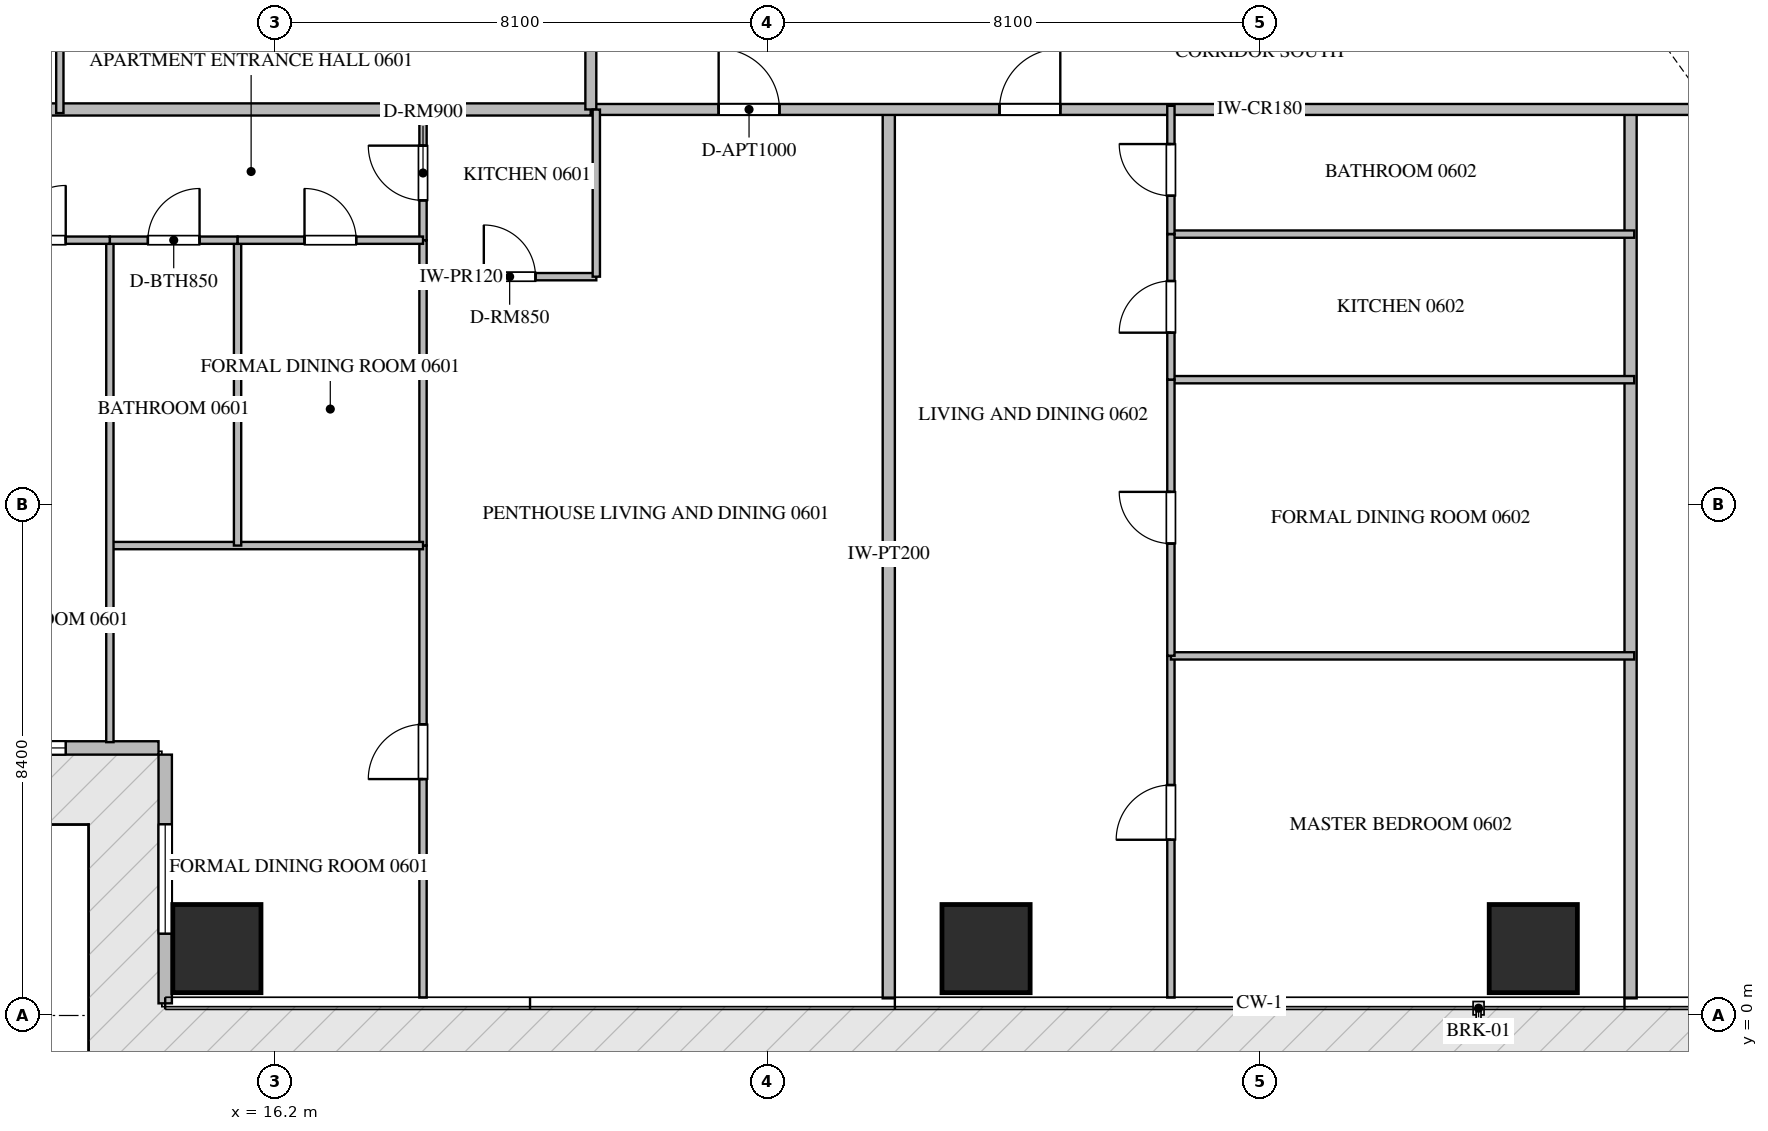
"""IFC4 building model, lengths in metres.
Left out: names, types, materials, properties, quantities, classifications, styles, units other than length and angle.
Written with IfcOpenShell. Run it as: python <this file> out.ifc"""

import sys

from ifc_helpers import new_model, si_unit, direction, frame, frame_2d, origin, origin_2d, place, context, subcontext, project, spatial, rectangle, extrude, source, transform, mapped, element, fill, save


model = new_model("IFC4")
c1 = context("Model", 3, precision=1e-05, world=origin(), true_north=direction((0.0, 1.0)))
c2 = subcontext(c1, "Body", "Model", "MODEL_VIEW")
j1 = project(units=[si_unit("LENGTHUNIT", "METRE"), si_unit("PLANEANGLEUNIT", "RADIAN")], contexts=[c1])
p1 = place(None, origin())
s1 = spatial("IfcSite", under=j1, at=p1, CompositionType="ELEMENT")
p2 = place(p1, origin())
s2 = spatial("IfcBuilding", under=s1, at=p2, CompositionType="ELEMENT")
p3 = place(p2, frame((0.0, 0.0, 30.45)))
s3 = spatial("IfcBuildingStorey", under=s2, at=p3, CompositionType="ELEMENT", Elevation=30.45)
m1 = source(origin(), c2, "Body", "SweptSolid", [
    extrude(rectangle(XDim=1.45, YDim=1.45, at=origin_2d()), origin(), (0.0, 0.0, 1.0), 3.75),
])
for number, where, z_axis, x_axis in (
    (1, (15.25, 1.1, -0.26), (0.0, 0.0, 1.0), (1.0, 0.0, 0.0)),
    (2, (27.9, 1.1, -0.26), (0.0, 0.0, 1.0), (1.0, 0.0, 0.0)),
    (3, (36.9, 1.1, -0.26), (0.0, 0.0, 1.0), (1.0, 0.0, 0.0)),
):
    element("IfcColumn", number, at=place(p3, frame(where, z_axis=z_axis, x_axis=x_axis)), inside=s3, PredefinedType="COLUMN", context=c2, shape_type="MappedRepresentation", body=[
        mapped(m1, transform((0.0, 0.0, 0.0), scale=1.0)),
    ])
p4 = place(p3, frame((10.31, 4.4, 0.0), z_axis=(0.0, 0.0, 1.0), x_axis=(1.0, 0.0, 0.0)))
e4 = element("IfcWall", 4, at=p4, inside=s3, PredefinedType="ELEMENTEDWALL", context=c2, shape_type="SweptSolid", body=[
    extrude(rectangle(XDim=3.98, YDim=0.22, at=frame_2d((1.99, 0.0))), origin(), (0.0, 0.0, 1.0), 3.475),
])
p5 = place(p4, frame((0.654, 0.0, 0.65)))
e5 = element("IfcOpeningElement", 5, at=p5, cuts=e4, PredefinedType="OPENING", context=c2, shape_type="SweptSolid", body=[
    extrude(rectangle(XDim=1.8, YDim=2.1, at=frame_2d((0.9, 1.05))), frame((0.0, 0.12, 0.0), z_axis=(0.0, -1.0, 0.0), x_axis=(1.0, 0.0, 0.0)), (0.0, 0.0, 1.0), 0.24),
])
p6 = place(p3, frame((14.4, 4.29, 0.0), z_axis=(0.0, 0.0, 1.0), x_axis=(0.0, -1.0, 0.0)))
e6 = element("IfcWall", 6, at=p6, inside=s3, PredefinedType="ELEMENTEDWALL", context=c2, shape_type="SweptSolid", body=[
    extrude(rectangle(XDim=4.09, YDim=0.22, at=frame_2d((2.045, 0.0))), origin(), (0.0, 0.0, 1.0), 3.475),
])
p7 = place(p6, frame((1.145, 0.0, 0.65)))
e7 = element("IfcOpeningElement", 7, at=p7, cuts=e6, PredefinedType="OPENING", context=c2, shape_type="SweptSolid", body=[
    extrude(rectangle(XDim=1.8, YDim=2.1, at=frame_2d((0.9, 1.05))), frame((0.0, 0.12, 0.0), z_axis=(0.0, -1.0, 0.0), x_axis=(1.0, 0.0, 0.0)), (0.0, 0.0, 1.0), 0.24),
])
for number, where, z_axis, x_axis in (
    (8, (26.3, 0.282, 0.0), (0.0, 0.0, 1.0), (0.0, 1.0, 0.0)),
    (9, (38.5, 0.282, 0.0), (0.0, 0.0, 1.0), (0.0, 1.0, 0.0)),
):
    element("IfcWall", number, at=place(p3, frame(where, z_axis=z_axis, x_axis=x_axis)), inside=s3, PredefinedType="PARTITIONING", context=c2, shape_type="SweptSolid", body=[
        extrude(rectangle(XDim=14.618, YDim=0.2, at=frame_2d((7.309, 0.0))), origin(), (0.0, 0.0, 1.0), 3.49),
    ])
p8 = place(p3, frame((6.082, 14.9, 0.0), z_axis=(0.0, 0.0, 1.0), x_axis=(1.0, 0.0, 0.0)))
e10 = element("IfcWall", 10, at=p8, inside=s3, PredefinedType="PARTITIONING", context=c2, shape_type="SweptSolid", body=[
    extrude(rectangle(XDim=15.318, YDim=0.2, at=frame_2d((7.659, 0.0))), origin(), (0.0, 0.0, 1.0), 3.49),
])
p9 = place(p3, frame((21.402, 14.9, 0.0), z_axis=(0.0, 0.0, 1.0), x_axis=(1.0, 0.0, 0.0)))
e11 = element("IfcWall", 11, at=p9, inside=s3, PredefinedType="PARTITIONING", context=c2, shape_type="SweptSolid", body=[
    extrude(rectangle(XDim=21.996, YDim=0.18, at=frame_2d((10.998, 0.0))), origin(), (0.0, 0.0, 1.0), 3.49),
])
p10 = place(p9, frame((2.1, 0.0, 0.0)))
e12 = element("IfcOpeningElement", 12, at=p10, cuts=e11, PredefinedType="OPENING", context=c2, shape_type="SweptSolid", body=[
    extrude(rectangle(XDim=1.0, YDim=2.15, at=frame_2d((0.5, 1.075))), frame((0.0, 0.1, 0.0), z_axis=(0.0, -1.0, 0.0), x_axis=(1.0, 0.0, 0.0)), (0.0, 0.0, 1.0), 0.2),
])
p11 = place(p9, frame((6.719, 0.0, 0.0)))
e13 = element("IfcOpeningElement", 13, at=p11, cuts=e11, PredefinedType="OPENING", context=c2, shape_type="SweptSolid", body=[
    extrude(rectangle(XDim=1.0, YDim=2.15, at=frame_2d((0.5, 1.075))), frame((0.0, 0.1, 0.0), z_axis=(0.0, -1.0, 0.0), x_axis=(1.0, 0.0, 0.0)), (0.0, 0.0, 1.0), 0.2),
])
p12 = place(p9, frame((18.896, 0.0, 0.0)))
e14 = element("IfcOpeningElement", 14, at=p12, cuts=e11, PredefinedType="OPENING", context=c2, shape_type="SweptSolid", body=[
    extrude(rectangle(XDim=1.0, YDim=2.15, at=frame_2d((0.5, 1.075))), frame((0.0, 0.1, 0.0), z_axis=(0.0, -1.0, 0.0), x_axis=(1.0, 0.0, 0.0)), (0.0, 0.0, 1.0), 0.2),
])
p13 = place(p3, frame((21.4, 14.9, 0.0), z_axis=(0.0, 0.0, 1.0), x_axis=(0.0, 1.0, 0.0)))
e15 = element("IfcWall", 15, at=p13, inside=s3, PredefinedType="PARTITIONING", context=c2, shape_type="SweptSolid", body=[
    extrude(rectangle(XDim=20.6, YDim=0.18, at=frame_2d((10.3, 0.0))), origin(), (0.0, 0.0, 1.0), 3.49),
])
p14 = place(p13, frame((17.64, 0.0, 0.0)))
e16 = element("IfcOpeningElement", 16, at=p14, cuts=e15, PredefinedType="OPENING", context=c2, shape_type="SweptSolid", body=[
    extrude(rectangle(XDim=1.0, YDim=2.15, at=frame_2d((0.5, 1.075))), frame((0.0, 0.1, 0.0), z_axis=(0.0, -1.0, 0.0), x_axis=(1.0, 0.0, 0.0)), (0.0, 0.0, 1.0), 0.2),
])
p15 = place(p3, frame((18.64, 12.15, 0.0), z_axis=(0.0, 0.0, 1.0), x_axis=(1.0, 0.0, 0.0)))
e17 = element("IfcWall", 17, at=p15, inside=s3, PredefinedType="PARTITIONING", context=c2, shape_type="SweptSolid", body=[
    extrude(rectangle(XDim=2.85, YDim=0.12, at=frame_2d((1.425, 0.0))), origin(), (0.0, 0.0, 1.0), 3.49),
])
p16 = place(p15, frame((1.0, 0.0, 0.0)))
e18 = element("IfcOpeningElement", 18, at=p16, cuts=e17, PredefinedType="OPENING", context=c2, shape_type="SweptSolid", body=[
    extrude(rectangle(XDim=0.85, YDim=2.1, at=frame_2d((0.425, 1.05))), frame((0.0, 0.07, 0.0), z_axis=(0.0, -1.0, 0.0), x_axis=(1.0, 0.0, 0.0)), (0.0, 0.0, 1.0), 0.14),
])
p17 = place(p3, frame((21.49, 12.15, 0.0), z_axis=(0.0, 0.0, 1.0), x_axis=(0.0, 1.0, 0.0)))
e19 = element("IfcWall", 19, at=p17, inside=s3, PredefinedType="PARTITIONING", context=c2, shape_type="SweptSolid", body=[
    extrude(rectangle(XDim=2.748, YDim=0.12, at=frame_2d((1.374, 0.0))), origin(), (0.0, 0.0, 1.0), 3.49),
])
p18 = place(p3, frame((18.64, 12.75, 0.0), z_axis=(0.0, 0.0, 1.0), x_axis=(0.0, 1.0, 0.0)))
e20 = element("IfcWall", 20, at=p18, inside=s3, PredefinedType="PARTITIONING", context=c2, shape_type="SweptSolid", body=[
    extrude(rectangle(XDim=2.21, YDim=0.12, at=frame_2d((1.105, 0.0))), origin(), (0.0, 0.0, 1.0), 3.49),
])
p19 = place(p18, frame((0.655, 0.0, 0.0)))
e21 = element("IfcOpeningElement", 21, at=p19, cuts=e20, PredefinedType="OPENING", context=c2, shape_type="SweptSolid", body=[
    extrude(rectangle(XDim=0.9, YDim=2.1, at=frame_2d((0.45, 1.05))), frame((0.0, 0.07, 0.0), z_axis=(0.0, -1.0, 0.0), x_axis=(1.0, 0.0, 0.0)), (0.0, 0.0, 1.0), 0.14),
])
p20 = place(p3, frame((18.64, 0.295, 0.0), z_axis=(0.0, 0.0, 1.0), x_axis=(0.0, 1.0, 0.0)))
e22 = element("IfcWall", 22, at=p20, inside=s3, PredefinedType="PARTITIONING", context=c2, shape_type="SweptSolid", body=[
    extrude(rectangle(XDim=7.433, YDim=0.12, at=frame_2d((3.717, 0.0))), origin(), (0.0, 0.0, 1.0), 3.49),
])
p21 = place(p20, frame((3.593, 0.0, 0.0)))
e23 = element("IfcOpeningElement", 23, at=p21, cuts=e22, PredefinedType="OPENING", context=c2, shape_type="SweptSolid", body=[
    extrude(rectangle(XDim=0.9, YDim=2.1, at=frame_2d((0.45, 1.05))), frame((0.0, 0.07, 0.0), z_axis=(0.0, -1.0, 0.0), x_axis=(1.0, 0.0, 0.0)), (0.0, 0.0, 1.0), 0.14),
])
p22 = place(p3, frame((18.64, 7.73, 0.0), z_axis=(0.0, 0.0, 1.0), x_axis=(0.0, 1.0, 0.0)))
e24 = element("IfcWall", 24, at=p22, inside=s3, PredefinedType="PARTITIONING", context=c2, shape_type="SweptSolid", body=[
    extrude(rectangle(XDim=5.018, YDim=0.12, at=frame_2d((2.509, 0.0))), origin(), (0.0, 0.0, 1.0), 3.49),
])
p23 = place(p3, frame((13.49, 7.728, 0.0), z_axis=(0.0, 0.0, 1.0), x_axis=(1.0, 0.0, 0.0)))
e25 = element("IfcWall", 25, at=p23, inside=s3, PredefinedType="PARTITIONING", context=c2, shape_type="SweptSolid", body=[
    extrude(rectangle(XDim=5.15, YDim=0.12, at=frame_2d((2.575, 0.0))), origin(), (0.0, 0.0, 1.0), 3.49),
])
p24 = place(p3, frame((13.49, 4.495, 0.0), z_axis=(0.0, 0.0, 1.0), x_axis=(0.0, 1.0, 0.0)))
e26 = element("IfcWall", 26, at=p24, inside=s3, PredefinedType="PARTITIONING", context=c2, shape_type="SweptSolid", body=[
    extrude(rectangle(XDim=8.255, YDim=0.12, at=frame_2d((4.127, 0.0))), origin(), (0.0, 0.0, 1.0), 3.49),
])
p25 = place(p3, frame((15.59, 7.728, 0.0), z_axis=(0.0, 0.0, 1.0), x_axis=(0.0, 1.0, 0.0)))
e27 = element("IfcWall", 27, at=p25, inside=s3, PredefinedType="PARTITIONING", context=c2, shape_type="SweptSolid", body=[
    extrude(rectangle(XDim=5.022, YDim=0.12, at=frame_2d((2.511, 0.0))), origin(), (0.0, 0.0, 1.0), 3.49),
])
p26 = place(p3, frame((13.49, 12.75, 0.0), z_axis=(0.0, 0.0, 1.0), x_axis=(1.0, 0.0, 0.0)))
e28 = element("IfcWall", 28, at=p26, inside=s3, PredefinedType="PARTITIONING", context=c2, shape_type="SweptSolid", body=[
    extrude(rectangle(XDim=2.1, YDim=0.12, at=frame_2d((1.05, 0.0))), origin(), (0.0, 0.0, 1.0), 3.49),
])
p27 = place(p26, frame((0.625, 0.0, 0.0)))
e29 = element("IfcOpeningElement", 29, at=p27, cuts=e28, PredefinedType="OPENING", context=c2, shape_type="SweptSolid", body=[
    extrude(rectangle(XDim=0.85, YDim=2.1, at=frame_2d((0.425, 1.05))), frame((0.0, 0.07, 0.0), z_axis=(0.0, -1.0, 0.0), x_axis=(1.0, 0.0, 0.0)), (0.0, 0.0, 1.0), 0.14),
])
p28 = place(p3, frame((15.592, 12.75, 0.0), z_axis=(0.0, 0.0, 1.0), x_axis=(1.0, 0.0, 0.0)))
e30 = element("IfcWall", 30, at=p28, inside=s3, PredefinedType="PARTITIONING", context=c2, shape_type="SweptSolid", body=[
    extrude(rectangle(XDim=3.048, YDim=0.12, at=frame_2d((1.524, 0.0))), origin(), (0.0, 0.0, 1.0), 3.49),
])
p29 = place(p28, frame((1.099, 0.0, 0.0)))
e31 = element("IfcOpeningElement", 31, at=p29, cuts=e30, PredefinedType="OPENING", context=c2, shape_type="SweptSolid", body=[
    extrude(rectangle(XDim=0.85, YDim=2.1, at=frame_2d((0.425, 1.05))), frame((0.0, 0.07, 0.0), z_axis=(0.0, -1.0, 0.0), x_axis=(1.0, 0.0, 0.0)), (0.0, 0.0, 1.0), 0.14),
])
p30 = place(p3, frame((11.14, 12.75, 0.0), z_axis=(0.0, 0.0, 1.0), x_axis=(1.0, 0.0, 0.0)))
e32 = element("IfcWall", 32, at=p30, inside=s3, PredefinedType="PARTITIONING", context=c2, shape_type="SweptSolid", body=[
    extrude(rectangle(XDim=2.348, YDim=0.12, at=frame_2d((1.174, 0.0))), origin(), (0.0, 0.0, 1.0), 3.49),
])
p31 = place(p30, frame((0.724, 0.0, 0.0)))
e33 = element("IfcOpeningElement", 33, at=p31, cuts=e32, PredefinedType="OPENING", context=c2, shape_type="SweptSolid", body=[
    extrude(rectangle(XDim=0.9, YDim=2.1, at=frame_2d((0.45, 1.05))), frame((0.0, 0.07, 0.0), z_axis=(0.0, -1.0, 0.0), x_axis=(1.0, 0.0, 0.0)), (0.0, 0.0, 1.0), 0.14),
])
p32 = place(p3, frame((30.94, 0.295, 0.0), z_axis=(0.0, 0.0, 1.0), x_axis=(0.0, 1.0, 0.0)))
e34 = element("IfcWall", 34, at=p32, inside=s3, PredefinedType="PARTITIONING", context=c2, shape_type="SweptSolid", body=[
    extrude(rectangle(XDim=5.619, YDim=0.12, at=frame_2d((2.81, 0.0))), origin(), (0.0, 0.0, 1.0), 3.49),
])
p33 = place(p32, frame((2.595, 0.0, 0.0)))
e35 = element("IfcOpeningElement", 35, at=p33, cuts=e34, PredefinedType="OPENING", context=c2, shape_type="SweptSolid", body=[
    extrude(rectangle(XDim=0.9, YDim=2.1, at=frame_2d((0.45, 1.05))), frame((0.0, 0.07, 0.0), z_axis=(0.0, -1.0, 0.0), x_axis=(1.0, 0.0, 0.0)), (0.0, 0.0, 1.0), 0.14),
])
for number, where, z_axis, x_axis in (
    (36, (30.94, 5.914, 0.0), (0.0, 0.0, 1.0), (1.0, 0.0, 0.0)),
    (37, (30.94, 10.456, 0.0), (0.0, 0.0, 1.0), (1.0, 0.0, 0.0)),
    (38, (30.94, 12.85, 0.0), (0.0, 0.0, 1.0), (1.0, 0.0, 0.0)),
):
    element("IfcWall", number, at=place(p3, frame(where, z_axis=z_axis, x_axis=x_axis)), inside=s3, PredefinedType="PARTITIONING", context=c2, shape_type="SweptSolid", body=[
        extrude(rectangle(XDim=7.62, YDim=0.12, at=frame_2d((3.81, 0.0))), origin(), (0.0, 0.0, 1.0), 3.49),
    ])
p34 = place(p3, frame((30.94, 5.916, 0.0), z_axis=(0.0, 0.0, 1.0), x_axis=(0.0, 1.0, 0.0)))
e39 = element("IfcWall", 39, at=p34, inside=s3, PredefinedType="PARTITIONING", context=c2, shape_type="SweptSolid", body=[
    extrude(rectangle(XDim=4.54, YDim=0.12, at=frame_2d((2.27, 0.0))), origin(), (0.0, 0.0, 1.0), 3.49),
])
p35 = place(p34, frame((1.845, 0.0, 0.0)))
e40 = element("IfcOpeningElement", 40, at=p35, cuts=e39, PredefinedType="OPENING", context=c2, shape_type="SweptSolid", body=[
    extrude(rectangle(XDim=0.85, YDim=2.1, at=frame_2d((0.425, 1.05))), frame((0.0, 0.07, 0.0), z_axis=(0.0, -1.0, 0.0), x_axis=(1.0, 0.0, 0.0)), (0.0, 0.0, 1.0), 0.14),
])
p36 = place(p3, frame((30.94, 10.458, 0.0), z_axis=(0.0, 0.0, 1.0), x_axis=(0.0, 1.0, 0.0)))
e41 = element("IfcWall", 41, at=p36, inside=s3, PredefinedType="PARTITIONING", context=c2, shape_type="SweptSolid", body=[
    extrude(rectangle(XDim=2.392, YDim=0.12, at=frame_2d((1.196, 0.0))), origin(), (0.0, 0.0, 1.0), 3.49),
])
p37 = place(p36, frame((0.771, 0.0, 0.0)))
e42 = element("IfcOpeningElement", 42, at=p37, cuts=e41, PredefinedType="OPENING", context=c2, shape_type="SweptSolid", body=[
    extrude(rectangle(XDim=0.85, YDim=2.1, at=frame_2d((0.425, 1.05))), frame((0.0, 0.07, 0.0), z_axis=(0.0, -1.0, 0.0), x_axis=(1.0, 0.0, 0.0)), (0.0, 0.0, 1.0), 0.14),
])
p38 = place(p3, frame((30.94, 12.852, 0.0), z_axis=(0.0, 0.0, 1.0), x_axis=(0.0, 1.0, 0.0)))
e43 = element("IfcWall", 43, at=p38, inside=s3, PredefinedType="PARTITIONING", context=c2, shape_type="SweptSolid", body=[
    extrude(rectangle(XDim=2.108, YDim=0.12, at=frame_2d((1.054, 0.0))), origin(), (0.0, 0.0, 1.0), 3.49),
])
p39 = place(p38, frame((0.629, 0.0, 0.0)))
e44 = element("IfcOpeningElement", 44, at=p39, cuts=e43, PredefinedType="OPENING", context=c2, shape_type="SweptSolid", body=[
    extrude(rectangle(XDim=0.85, YDim=2.1, at=frame_2d((0.425, 1.05))), frame((0.0, 0.07, 0.0), z_axis=(0.0, -1.0, 0.0), x_axis=(1.0, 0.0, 0.0)), (0.0, 0.0, 1.0), 0.14),
])
p40 = place(p3, frame((12.667, 14.84, 0.0), z_axis=(0.0, 0.0, 1.0), x_axis=(0.0, 1.0, 0.0)))
e45 = element("IfcWall", 45, at=p40, inside=s3, PredefinedType="PARTITIONING", context=c2, shape_type="SweptSolid", body=[
    extrude(rectangle(XDim=5.41, YDim=0.12, at=frame_2d((2.705, 0.0))), origin(), (0.0, 0.0, 1.0), 3.49),
])
m2 = source(origin(), c2, "Body", "SweptSolid", [
    extrude(rectangle(XDim=1.8, YDim=2.1, at=frame_2d((0.9, 1.05))), frame((0.0, 0.03, 0.0), z_axis=(0.0, -1.0, 0.0), x_axis=(1.0, 0.0, 0.0)), (0.0, 0.0, 1.0), 0.06),
])
p41 = place(p5, origin())
e46 = element("IfcWindow", 46, at=p41, inside=s3, PartitioningType="SINGLE_PANEL", PredefinedType="WINDOW", context=c2, shape_type="MappedRepresentation", body=[
    mapped(m2, transform((0.0, 0.0, 0.0), scale=1.0)),
])
fill(e5, e46)
p42 = place(p7, origin())
e47 = element("IfcWindow", 47, at=p42, inside=s3, PartitioningType="SINGLE_PANEL", PredefinedType="WINDOW", context=c2, shape_type="MappedRepresentation", body=[
    mapped(m2, transform((0.0, 0.0, 0.0), scale=1.0)),
])
fill(e7, e47)
m3 = source(origin(), c2, "Body", "SweptSolid", [
    extrude(rectangle(XDim=1.0, YDim=2.15, at=frame_2d((0.5, 1.075))), frame((0.0, 0.025, 0.0), z_axis=(0.0, -1.0, 0.0), x_axis=(1.0, 0.0, 0.0)), (0.0, 0.0, 1.0), 0.05),
])
p43 = place(p10, origin())
e48 = element("IfcDoor", 48, at=p43, inside=s3, OperationType="SINGLE_SWING_LEFT", PredefinedType="DOOR", context=c2, shape_type="MappedRepresentation", body=[
    mapped(m3, transform((0.0, 0.0, 0.0), scale=1.0)),
])
fill(e12, e48)
p44 = place(p11, origin())
e49 = element("IfcDoor", 49, at=p44, inside=s3, OperationType="SINGLE_SWING_RIGHT", PredefinedType="DOOR", context=c2, shape_type="MappedRepresentation", body=[
    mapped(m3, transform((0.0, 0.0, 0.0), scale=1.0)),
])
fill(e13, e49)
m4 = source(origin(), c2, "Body", "SweptSolid", [
    extrude(rectangle(XDim=0.85, YDim=2.1, at=frame_2d((0.425, 1.05))), frame((0.0, 0.025, 0.0), z_axis=(0.0, -1.0, 0.0), x_axis=(1.0, 0.0, 0.0)), (0.0, 0.0, 1.0), 0.05),
])
p45 = place(p16, origin())
e50 = element("IfcDoor", 50, at=p45, inside=s3, OperationType="SINGLE_SWING_LEFT", PredefinedType="DOOR", context=c2, shape_type="MappedRepresentation", body=[
    mapped(m4, transform((0.0, 0.0, 0.0), scale=1.0)),
])
fill(e18, e50)
m5 = source(origin(), c2, "Body", "SweptSolid", [
    extrude(rectangle(XDim=0.9, YDim=2.1, at=frame_2d((0.45, 1.05))), frame((0.0, 0.025, 0.0), z_axis=(0.0, -1.0, 0.0), x_axis=(1.0, 0.0, 0.0)), (0.0, 0.0, 1.0), 0.05),
])
p46 = place(p19, origin())
e51 = element("IfcDoor", 51, at=p46, inside=s3, OperationType="SINGLE_SWING_RIGHT", PredefinedType="DOOR", context=c2, shape_type="MappedRepresentation", body=[
    mapped(m5, transform((0.0, 0.0, 0.0), scale=1.0)),
])
fill(e21, e51)
p47 = place(p21, origin())
e52 = element("IfcDoor", 52, at=p47, inside=s3, OperationType="SINGLE_SWING_LEFT", PredefinedType="DOOR", context=c2, shape_type="MappedRepresentation", body=[
    mapped(m5, transform((0.0, 0.0, 0.0), scale=1.0)),
])
fill(e23, e52)
p48 = place(p27, origin())
e53 = element("IfcDoor", 53, at=p48, inside=s3, OperationType="SINGLE_SWING_RIGHT", PredefinedType="DOOR", context=c2, shape_type="MappedRepresentation", body=[
    mapped(m4, transform((0.0, 0.0, 0.0), scale=1.0)),
])
fill(e29, e53)
p49 = place(p29, origin())
e54 = element("IfcDoor", 54, at=p49, inside=s3, OperationType="SINGLE_SWING_LEFT", PredefinedType="DOOR", context=c2, shape_type="MappedRepresentation", body=[
    mapped(m4, transform((0.0, 0.0, 0.0), scale=1.0)),
])
fill(e31, e54)
p50 = place(p31, origin())
e55 = element("IfcDoor", 55, at=p50, inside=s3, OperationType="SINGLE_SWING_RIGHT", PredefinedType="DOOR", context=c2, shape_type="MappedRepresentation", body=[
    mapped(m5, transform((0.0, 0.0, 0.0), scale=1.0)),
])
fill(e33, e55)
p51 = place(p33, origin())
e56 = element("IfcDoor", 56, at=p51, inside=s3, OperationType="SINGLE_SWING_LEFT", PredefinedType="DOOR", context=c2, shape_type="MappedRepresentation", body=[
    mapped(m5, transform((0.0, 0.0, 0.0), scale=1.0)),
])
fill(e35, e56)
p52 = place(p35, origin())
e57 = element("IfcDoor", 57, at=p52, inside=s3, OperationType="SINGLE_SWING_RIGHT", PredefinedType="DOOR", context=c2, shape_type="MappedRepresentation", body=[
    mapped(m4, transform((0.0, 0.0, 0.0), scale=1.0)),
])
fill(e40, e57)
p53 = place(p37, origin())
e58 = element("IfcDoor", 58, at=p53, inside=s3, OperationType="SINGLE_SWING_LEFT", PredefinedType="DOOR", context=c2, shape_type="MappedRepresentation", body=[
    mapped(m4, transform((0.0, 0.0, 0.0), scale=1.0)),
])
fill(e42, e58)
p54 = place(p39, origin())
e59 = element("IfcDoor", 59, at=p54, inside=s3, OperationType="SINGLE_SWING_RIGHT", PredefinedType="DOOR", context=c2, shape_type="MappedRepresentation", body=[
    mapped(m4, transform((0.0, 0.0, 0.0), scale=1.0)),
])
fill(e44, e59)
save(model, sys.argv[1])
